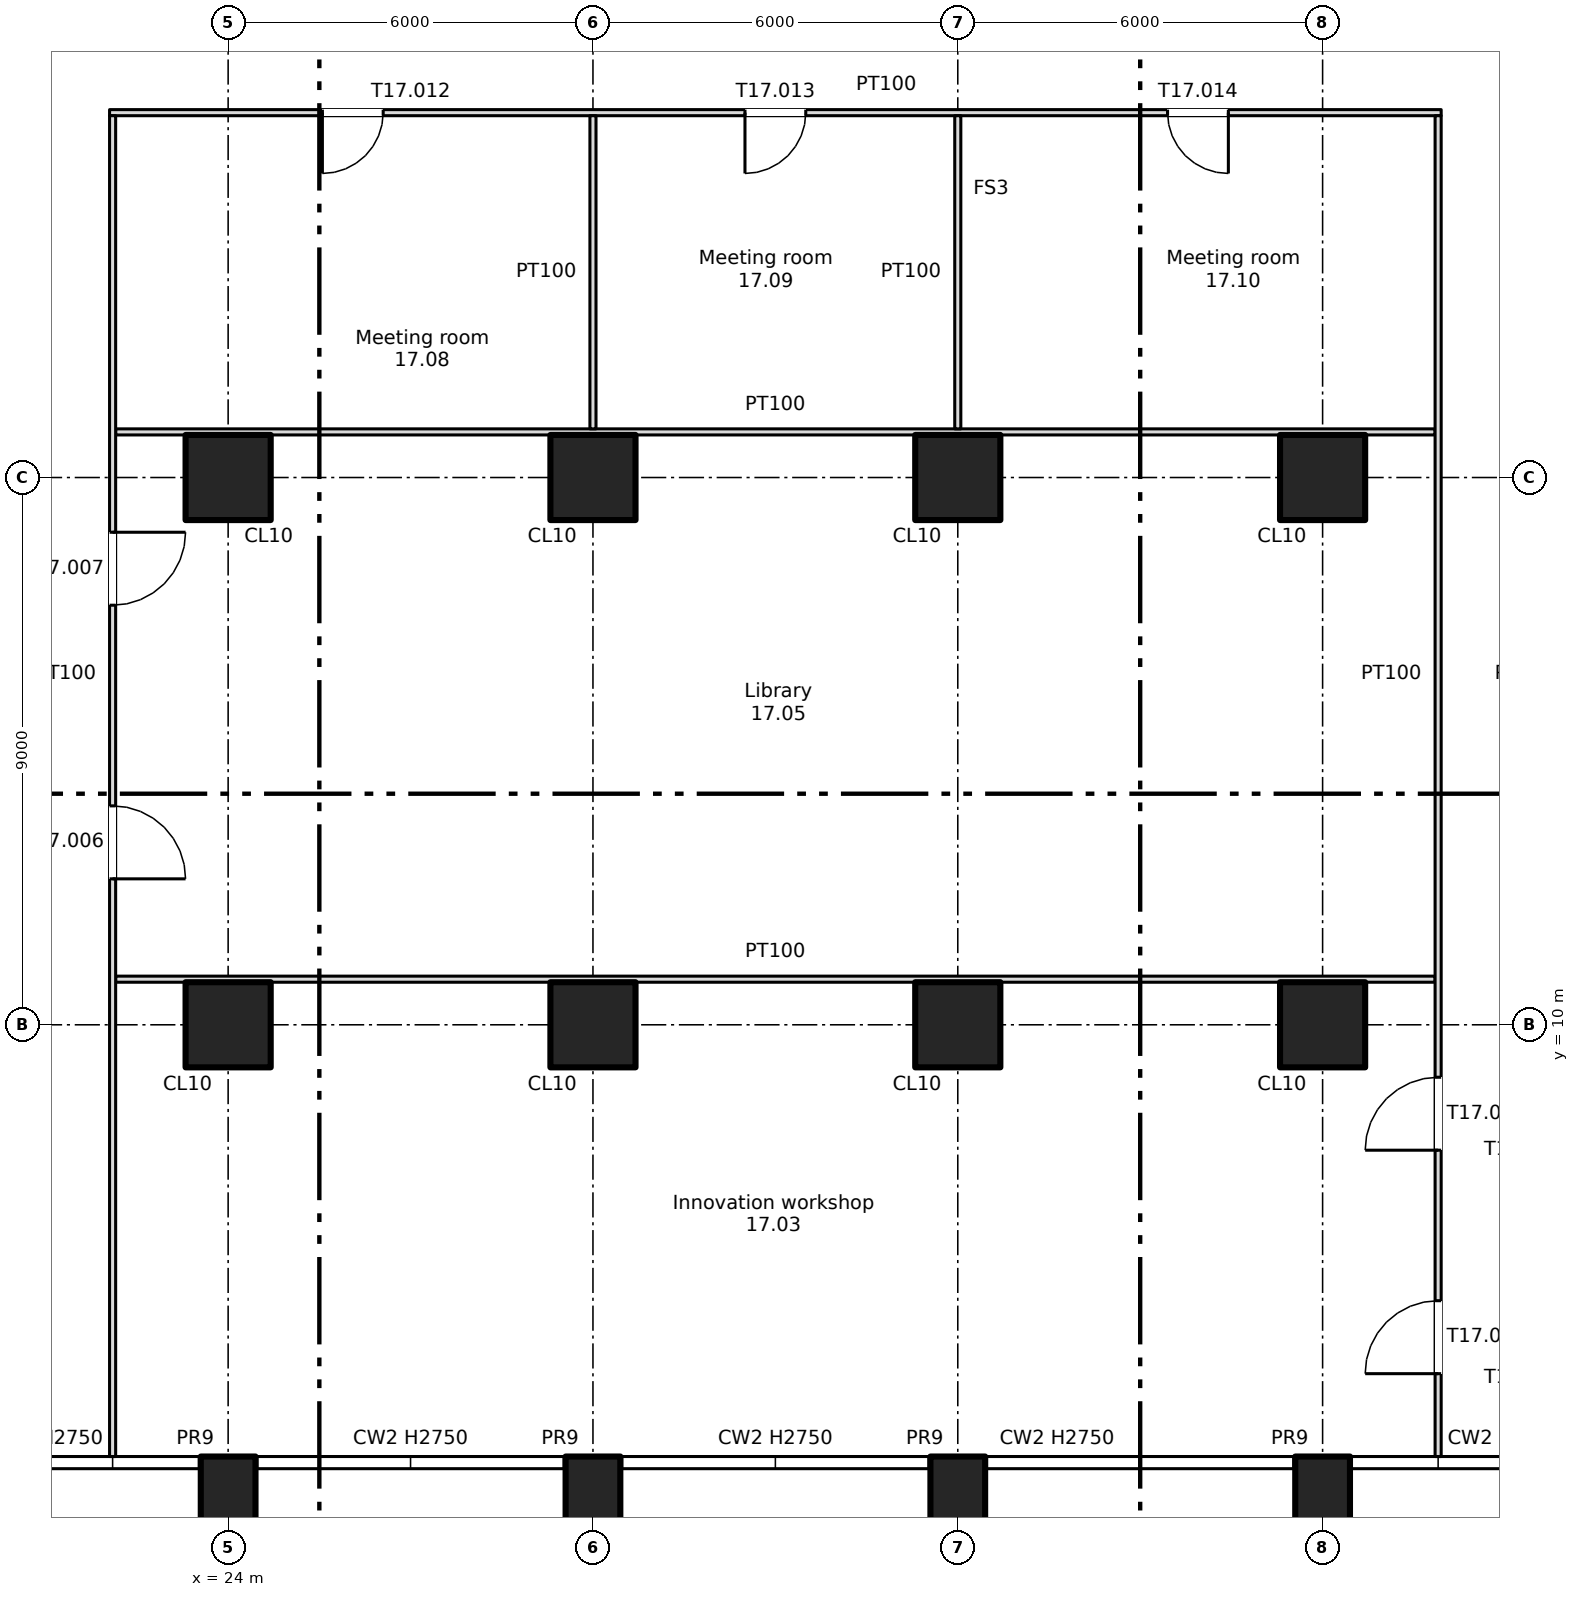
"""IFC4 building model, lengths in metres.
Left out: names, types, materials, properties, quantities, classifications, styles, units other than length and angle.
Written with IfcOpenShell. Run it as: python <this file> out.ifc"""

import sys

from ifc_helpers import new_model, si_unit, direction, frame, frame_2d, origin, origin_2d, place, context, subcontext, project, spatial, rectangle, extrude, element, fill, save


model = new_model("IFC4")
c1 = context("Model", 3, precision=1e-05, world=origin(), true_north=direction((0.0, 1.0)))
c2 = subcontext(c1, "Body", "Model", "MODEL_VIEW")
j1 = project(units=[si_unit("LENGTHUNIT", "METRE"), si_unit("PLANEANGLEUNIT", "RADIAN")], contexts=[c1])
p1 = place(None, origin())
s1 = spatial("IfcSite", under=j1, at=p1, CompositionType="ELEMENT")
p2 = place(p1, origin())
s2 = spatial("IfcBuilding", under=s1, at=p2, CompositionType="ELEMENT")
p3 = place(p2, frame((0.0, 0.0, 110.0)))
s3 = spatial("IfcBuildingStorey", under=s2, at=p3, CompositionType="ELEMENT", Elevation=110.0)
for number, where, z_axis, x_axis in (
    (1, (24.0, 2.2, -0.4), (0.0, 0.0, 1.0), (1.0, 0.0, 0.0)),
    (2, (30.0, 2.2, -0.4), (0.0, 0.0, 1.0), (1.0, 0.0, 0.0)),
    (3, (36.0, 2.2, -0.4), (0.0, 0.0, 1.0), (1.0, 0.0, 0.0)),
    (4, (42.0, 2.2, -0.4), (0.0, 0.0, 1.0), (1.0, 0.0, 0.0)),
):
    element("IfcColumn", number, at=place(p3, frame(where, z_axis=z_axis, x_axis=x_axis)), inside=s3, PredefinedType="COLUMN", context=c2, shape_type="SweptSolid", body=[
        extrude(rectangle(XDim=0.9, YDim=1.4, at=origin_2d()), origin(), (0.0, 0.0, 1.0), 3.75),
    ])
for number, where, z_axis, x_axis in (
    (5, (24.0, 10.0, 0.0), (0.0, 0.0, 1.0), (1.0, 0.0, 0.0)),
    (6, (24.0, 19.0, 0.0), (0.0, 0.0, 1.0), (1.0, 0.0, 0.0)),
    (7, (30.0, 10.0, 0.0), (0.0, 0.0, 1.0), (1.0, 0.0, 0.0)),
    (8, (30.0, 19.0, 0.0), (0.0, 0.0, 1.0), (1.0, 0.0, 0.0)),
    (9, (36.0, 10.0, 0.0), (0.0, 0.0, 1.0), (1.0, 0.0, 0.0)),
    (10, (36.0, 19.0, 0.0), (0.0, 0.0, 1.0), (1.0, 0.0, 0.0)),
    (11, (42.0, 10.0, 0.0), (0.0, 0.0, 1.0), (1.0, 0.0, 0.0)),
    (12, (42.0, 19.0, 0.0), (0.0, 0.0, 1.0), (1.0, 0.0, 0.0)),
):
    element("IfcColumn", number, at=place(p3, frame(where, z_axis=z_axis, x_axis=x_axis)), inside=s3, PredefinedType="COLUMN", context=c2, shape_type="SweptSolid", body=[
        extrude(rectangle(XDim=1.4, YDim=1.4, at=origin_2d()), origin(), (0.0, 0.0, 1.0), 3.35),
    ])
for number, where, z_axis, x_axis in (
    (13, (22.15, 10.75, 0.0), (0.0, 0.0, 1.0), (1.0, 0.0, 0.0)),
    (14, (22.15, 19.75, 0.0), (0.0, 0.0, 1.0), (1.0, 0.0, 0.0)),
):
    element("IfcWall", number, at=place(p3, frame(where, z_axis=z_axis, x_axis=x_axis)), inside=s3, PredefinedType="PARTITIONING", context=c2, shape_type="SweptSolid", body=[
        extrude(rectangle(XDim=21.7, YDim=0.1, at=frame_2d((10.85, 0.0))), origin(), (0.0, 0.0, 1.0), 3.35),
    ])
p4 = place(p3, frame((22.05, 25.0, 0.0), z_axis=(0.0, 0.0, 1.0), x_axis=(1.0, 0.0, 0.0)))
e15 = element("IfcWall", 15, at=p4, inside=s3, PredefinedType="PARTITIONING", context=c2, shape_type="SweptSolid", body=[
    extrude(rectangle(XDim=21.9, YDim=0.1, at=frame_2d((10.95, 0.0))), origin(), (0.0, 0.0, 1.0), 3.35),
])
p5 = place(p4, frame((3.5, 0.0, 0.0)))
e16 = element("IfcOpeningElement", 16, at=p5, cuts=e15, PredefinedType="OPENING", context=c2, shape_type="SweptSolid", body=[
    extrude(rectangle(XDim=1.0, YDim=2.1, at=frame_2d((0.5, 1.05))), frame((0.0, 0.06, 0.0), z_axis=(0.0, -1.0, 0.0), x_axis=(1.0, 0.0, 0.0)), (0.0, 0.0, 1.0), 0.12),
])
p6 = place(p4, frame((10.45, 0.0, 0.0)))
e17 = element("IfcOpeningElement", 17, at=p6, cuts=e15, PredefinedType="OPENING", context=c2, shape_type="SweptSolid", body=[
    extrude(rectangle(XDim=1.0, YDim=2.1, at=frame_2d((0.5, 1.05))), frame((0.0, 0.06, 0.0), z_axis=(0.0, -1.0, 0.0), x_axis=(1.0, 0.0, 0.0)), (0.0, 0.0, 1.0), 0.12),
])
p7 = place(p4, frame((17.4, 0.0, 0.0)))
e18 = element("IfcOpeningElement", 18, at=p7, cuts=e15, PredefinedType="OPENING", context=c2, shape_type="SweptSolid", body=[
    extrude(rectangle(XDim=1.0, YDim=2.1, at=frame_2d((0.5, 1.05))), frame((0.0, 0.06, 0.0), z_axis=(0.0, -1.0, 0.0), x_axis=(1.0, 0.0, 0.0)), (0.0, 0.0, 1.0), 0.12),
])
p8 = place(p3, frame((22.1, 2.9, 0.0), z_axis=(0.0, 0.0, 1.0), x_axis=(0.0, 1.0, 0.0)))
e19 = element("IfcWall", 19, at=p8, inside=s3, PredefinedType="PARTITIONING", context=c2, shape_type="SweptSolid", body=[
    extrude(rectangle(XDim=22.05, YDim=0.1, at=frame_2d((11.025, 0.0))), origin(), (0.0, 0.0, 1.0), 3.35),
])
p9 = place(p8, frame((9.5, 0.0, 0.0)))
e20 = element("IfcOpeningElement", 20, at=p9, cuts=e19, PredefinedType="OPENING", context=c2, shape_type="SweptSolid", body=[
    extrude(rectangle(XDim=1.2, YDim=2.1, at=frame_2d((0.6, 1.05))), frame((0.0, 0.06, 0.0), z_axis=(0.0, -1.0, 0.0), x_axis=(1.0, 0.0, 0.0)), (0.0, 0.0, 1.0), 0.12),
])
p10 = place(p8, frame((14.0, 0.0, 0.0)))
e21 = element("IfcOpeningElement", 21, at=p10, cuts=e19, PredefinedType="OPENING", context=c2, shape_type="SweptSolid", body=[
    extrude(rectangle(XDim=1.2, YDim=2.1, at=frame_2d((0.6, 1.05))), frame((0.0, 0.06, 0.0), z_axis=(0.0, -1.0, 0.0), x_axis=(1.0, 0.0, 0.0)), (0.0, 0.0, 1.0), 0.12),
])
for number, where, z_axis, x_axis in (
    (22, (30.0, 19.8, 0.0), (0.0, 0.0, 1.0), (0.0, 1.0, 0.0)),
    (23, (36.0, 19.8, 0.0), (0.0, 0.0, 1.0), (0.0, 1.0, 0.0)),
):
    element("IfcWall", number, at=place(p3, frame(where, z_axis=z_axis, x_axis=x_axis)), inside=s3, PredefinedType="PARTITIONING", context=c2, shape_type="SweptSolid", body=[
        extrude(rectangle(XDim=5.15, YDim=0.1, at=frame_2d((2.575, 0.0))), origin(), (0.0, 0.0, 1.0), 3.35),
    ])
p11 = place(p3, frame((43.9, 2.9, 0.0), z_axis=(0.0, 0.0, 1.0), x_axis=(0.0, 1.0, 0.0)))
e24 = element("IfcWall", 24, at=p11, inside=s3, PredefinedType="PARTITIONING", context=c2, shape_type="SweptSolid", body=[
    extrude(rectangle(XDim=22.05, YDim=0.1, at=frame_2d((11.025, 0.0))), origin(), (0.0, 0.0, 1.0), 3.35),
])
p12 = place(p11, frame((1.363, 0.0, 0.0)))
e25 = element("IfcOpeningElement", 25, at=p12, cuts=e24, PredefinedType="OPENING", context=c2, shape_type="SweptSolid", body=[
    extrude(rectangle(XDim=1.2, YDim=2.1, at=frame_2d((0.6, 1.05))), frame((0.0, 0.06, 0.0), z_axis=(0.0, -1.0, 0.0), x_axis=(1.0, 0.0, 0.0)), (0.0, 0.0, 1.0), 0.12),
])
p13 = place(p11, frame((5.038, 0.0, 0.0)))
e26 = element("IfcOpeningElement", 26, at=p13, cuts=e24, PredefinedType="OPENING", context=c2, shape_type="SweptSolid", body=[
    extrude(rectangle(XDim=1.2, YDim=2.1, at=frame_2d((0.6, 1.05))), frame((0.0, 0.06, 0.0), z_axis=(0.0, -1.0, 0.0), x_axis=(1.0, 0.0, 0.0)), (0.0, 0.0, 1.0), 0.12),
])
p14 = place(p12, origin())
e27 = element("IfcDoor", 27, at=p14, inside=s3, OperationType="SINGLE_SWING_LEFT", PredefinedType="DOOR", context=c2, shape_type="SweptSolid", body=[
    extrude(rectangle(XDim=1.2, YDim=2.1, at=frame_2d((0.6, 1.05))), frame((0.0, 0.025, 0.0), z_axis=(0.0, -1.0, 0.0), x_axis=(1.0, 0.0, 0.0)), (0.0, 0.0, 1.0), 0.05),
])
fill(e25, e27)
p15 = place(p13, origin())
e28 = element("IfcDoor", 28, at=p15, inside=s3, OperationType="SINGLE_SWING_LEFT", PredefinedType="DOOR", context=c2, shape_type="SweptSolid", body=[
    extrude(rectangle(XDim=1.2, YDim=2.1, at=frame_2d((0.6, 1.05))), frame((0.0, 0.025, 0.0), z_axis=(0.0, -1.0, 0.0), x_axis=(1.0, 0.0, 0.0)), (0.0, 0.0, 1.0), 0.05),
])
fill(e26, e28)
p16 = place(p9, origin())
e29 = element("IfcDoor", 29, at=p16, inside=s3, OperationType="SINGLE_SWING_LEFT", PredefinedType="DOOR", context=c2, shape_type="SweptSolid", body=[
    extrude(rectangle(XDim=1.2, YDim=2.1, at=frame_2d((0.6, 1.05))), frame((0.0, 0.025, 0.0), z_axis=(0.0, -1.0, 0.0), x_axis=(1.0, 0.0, 0.0)), (0.0, 0.0, 1.0), 0.05),
])
fill(e20, e29)
p17 = place(p10, origin())
e30 = element("IfcDoor", 30, at=p17, inside=s3, OperationType="SINGLE_SWING_RIGHT", PredefinedType="DOOR", context=c2, shape_type="SweptSolid", body=[
    extrude(rectangle(XDim=1.2, YDim=2.1, at=frame_2d((0.6, 1.05))), frame((0.0, 0.025, 0.0), z_axis=(0.0, -1.0, 0.0), x_axis=(1.0, 0.0, 0.0)), (0.0, 0.0, 1.0), 0.05),
])
fill(e21, e30)
p18 = place(p5, origin())
e31 = element("IfcDoor", 31, at=p18, inside=s3, OperationType="SINGLE_SWING_LEFT", PredefinedType="DOOR", context=c2, shape_type="SweptSolid", body=[
    extrude(rectangle(XDim=1.0, YDim=2.1, at=frame_2d((0.5, 1.05))), frame((0.0, 0.025, 0.0), z_axis=(0.0, -1.0, 0.0), x_axis=(1.0, 0.0, 0.0)), (0.0, 0.0, 1.0), 0.05),
])
fill(e16, e31)
p19 = place(p6, origin())
e32 = element("IfcDoor", 32, at=p19, inside=s3, OperationType="SINGLE_SWING_LEFT", PredefinedType="DOOR", context=c2, shape_type="SweptSolid", body=[
    extrude(rectangle(XDim=1.0, YDim=2.1, at=frame_2d((0.5, 1.05))), frame((0.0, 0.025, 0.0), z_axis=(0.0, -1.0, 0.0), x_axis=(1.0, 0.0, 0.0)), (0.0, 0.0, 1.0), 0.05),
])
fill(e17, e32)
p20 = place(p7, origin())
e33 = element("IfcDoor", 33, at=p20, inside=s3, OperationType="SINGLE_SWING_RIGHT", PredefinedType="DOOR", context=c2, shape_type="SweptSolid", body=[
    extrude(rectangle(XDim=1.0, YDim=2.1, at=frame_2d((0.5, 1.05))), frame((0.0, 0.025, 0.0), z_axis=(0.0, -1.0, 0.0), x_axis=(1.0, 0.0, 0.0)), (0.0, 0.0, 1.0), 0.05),
])
fill(e18, e33)
save(model, sys.argv[1])
